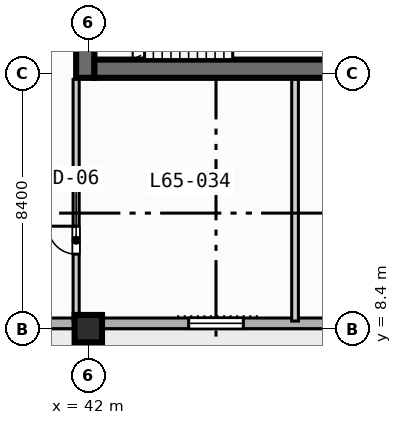
"""IFC4 building model, lengths in metres.
Left out: names, types, materials, properties, quantities, classifications, styles, units other than length and angle.
Written with IfcOpenShell. Run it as: python <this file> out.ifc"""

import sys

from ifc_helpers import new_model, si_unit, direction, frame, frame_2d, origin, origin_2d, place, context, subcontext, project, spatial, rectangle, extrude, element, fill, save


model = new_model("IFC4")
c1 = context("Model", 3, precision=1e-05, world=origin(), true_north=direction((0.0, 1.0)))
c2 = subcontext(c1, "Body", "Model", "MODEL_VIEW")
j1 = project(units=[si_unit("LENGTHUNIT", "METRE"), si_unit("PLANEANGLEUNIT", "RADIAN")], contexts=[c1])
p1 = place(None, origin())
s1 = spatial("IfcSite", under=j1, at=p1, CompositionType="ELEMENT")
p2 = place(p1, origin())
s2 = spatial("IfcBuilding", under=s1, at=p2, CompositionType="ELEMENT")
p3 = place(p2, frame((0.0, 0.0, 263.8)))
s3 = spatial("IfcBuildingStorey", under=s2, at=p3, CompositionType="ELEMENT", Elevation=263.8)
p4 = place(p3, frame((41.9, 16.65, 0.0), z_axis=(0.0, 0.0, 1.0), x_axis=(0.0, 1.0, 0.0)))
e1 = element("IfcWall", 1, at=p4, inside=s3, PredefinedType="SHEAR", context=c2, shape_type="SweptSolid", body=[
    extrude(rectangle(XDim=1.35, YDim=0.6, at=frame_2d((0.675, 0.0))), origin(), (0.0, 0.0, 1.0), 3.47),
])
p5 = place(p3, frame((42.2, 16.95, 0.0), z_axis=(0.0, 0.0, 1.0), x_axis=(1.0, 0.0, 0.0)))
e2 = element("IfcWall", 2, at=p5, inside=s3, PredefinedType="SHEAR", context=c2, shape_type="SweptSolid", body=[
    extrude(rectangle(XDim=16.35, YDim=0.6, at=frame_2d((8.175, 0.0))), origin(), (0.0, 0.0, 1.0), 3.47),
])
p6 = place(p3, frame((42.0, 8.4, 0.0), z_axis=(0.0, 0.0, 1.0), x_axis=(1.0, 0.0, 0.0)))
e3 = element("IfcColumn", 3, at=p6, inside=s3, PredefinedType="COLUMN", context=c2, shape_type="SweptSolid", body=[
    extrude(rectangle(XDim=0.9, YDim=0.9, at=origin_2d()), origin(), (0.0, 0.0, 1.0), 3.7),
])
p7 = place(p3, frame((72.425, 8.575, 0.0), z_axis=(0.0, 0.0, 1.0), x_axis=(-1.0, 0.0, 0.0)))
e4 = element("IfcWall", 4, at=p7, inside=s3, PredefinedType="STANDARD", context=c2, shape_type="SweptSolid", body=[
    extrude(rectangle(XDim=60.85, YDim=0.35, at=frame_2d((30.425, 0.0))), origin(), (0.0, 0.0, 1.0), 3.47),
])
p8 = place(p7, frame((41.325, 0.0, 0.0)))
e5 = element("IfcOpeningElement", 5, at=p8, cuts=e4, PredefinedType="OPENING", context=c2, shape_type="SweptSolid", body=[
    extrude(rectangle(XDim=1.4, YDim=2.2, at=frame_2d((0.7, 1.1))), frame((0.0, 0.185, 0.0), z_axis=(0.0, -1.0, 0.0), x_axis=(1.0, 0.0, 0.0)), (0.0, 0.0, 1.0), 0.37),
])
p9 = place(p7, frame((50.225, 0.0, 0.85)))
e6 = element("IfcOpeningElement", 6, at=p9, cuts=e4, PredefinedType="OPENING", context=c2, shape_type="SweptSolid", body=[
    extrude(rectangle(XDim=2.4, YDim=1.95, at=frame_2d((1.2, 0.975))), frame((0.0, 0.185, 0.0), z_axis=(0.0, -1.0, 0.0), x_axis=(1.0, 0.0, 0.0)), (0.0, 0.0, 1.0), 0.37),
])
p10 = place(p7, frame((33.425, 0.0, 0.85)))
e7 = element("IfcOpeningElement", 7, at=p10, cuts=e4, PredefinedType="OPENING", context=c2, shape_type="SweptSolid", body=[
    extrude(rectangle(XDim=2.4, YDim=1.95, at=frame_2d((1.2, 0.975))), frame((0.0, 0.185, 0.0), z_axis=(0.0, -1.0, 0.0), x_axis=(1.0, 0.0, 0.0)), (0.0, 0.0, 1.0), 0.37),
])
p11 = place(p7, frame((25.325, 0.0, 0.85)))
e8 = element("IfcOpeningElement", 8, at=p11, cuts=e4, PredefinedType="OPENING", context=c2, shape_type="SweptSolid", body=[
    extrude(rectangle(XDim=1.8, YDim=1.8, at=frame_2d((0.9, 0.9))), frame((0.0, 0.185, 0.0), z_axis=(0.0, -1.0, 0.0), x_axis=(1.0, 0.0, 0.0)), (0.0, 0.0, 1.0), 0.37),
])
p12 = place(p7, frame((58.15, 0.0, 0.85)))
e9 = element("IfcOpeningElement", 9, at=p12, cuts=e4, PredefinedType="OPENING", context=c2, shape_type="SweptSolid", body=[
    extrude(rectangle(XDim=1.8, YDim=1.8, at=frame_2d((0.9, 0.9))), frame((0.0, 0.185, 0.0), z_axis=(0.0, -1.0, 0.0), x_axis=(1.0, 0.0, 0.0)), (0.0, 0.0, 1.0), 0.37),
])
p13 = place(p7, frame((56.29, 0.0, 0.85)))
e10 = element("IfcOpeningElement", 10, at=p13, cuts=e4, PredefinedType="OPENING", context=c2, shape_type="SweptSolid", body=[
    extrude(rectangle(XDim=0.72, YDim=1.8, at=frame_2d((0.36, 0.9))), frame((0.0, 0.185, 0.0), z_axis=(0.0, -1.0, 0.0), x_axis=(1.0, 0.0, 0.0)), (0.0, 0.0, 1.0), 0.37),
])
p14 = place(p7, frame((44.15, 0.0, 0.85)))
e11 = element("IfcOpeningElement", 11, at=p14, cuts=e4, PredefinedType="OPENING", context=c2, shape_type="SweptSolid", body=[
    extrude(rectangle(XDim=1.8, YDim=1.8, at=frame_2d((0.9, 0.9))), frame((0.0, 0.185, 0.0), z_axis=(0.0, -1.0, 0.0), x_axis=(1.0, 0.0, 0.0)), (0.0, 0.0, 1.0), 0.37),
])
p15 = place(p3, frame((41.6, 8.65, 0.0), z_axis=(0.0, 0.0, 1.0), x_axis=(0.0, 1.0, 0.0)))
e12 = element("IfcWall", 12, at=p15, inside=s3, PredefinedType="PARTITIONING", context=c2, shape_type="SweptSolid", body=[
    extrude(rectangle(XDim=7.95, YDim=0.2, at=frame_2d((3.975, 0.0))), origin(), (0.0, 0.0, 1.0), 3.47),
])
p16 = place(p15, frame((2.2, 0.0, 0.0)))
e13 = element("IfcOpeningElement", 13, at=p16, cuts=e12, PredefinedType="OPENING", context=c2, shape_type="SweptSolid", body=[
    extrude(rectangle(XDim=0.92, YDim=2.1, at=frame_2d((0.46, 1.05))), frame((0.0, 0.11, 0.0), z_axis=(0.0, -1.0, 0.0), x_axis=(1.0, 0.0, 0.0)), (0.0, 0.0, 1.0), 0.22),
])
p17 = place(p3, frame((48.8, 8.65, 0.0), z_axis=(0.0, 0.0, 1.0), x_axis=(0.0, 1.0, 0.0)))
e14 = element("IfcWall", 14, at=p17, inside=s3, PredefinedType="PARTITIONING", context=c2, shape_type="SweptSolid", body=[
    extrude(rectangle(XDim=7.95, YDim=0.22, at=frame_2d((3.975, 0.0))), origin(), (0.0, 0.0, 1.0), 3.47),
])
p18 = place(p11, origin())
e15 = element("IfcWindow", 15, at=p18, inside=s3, PartitioningType="SINGLE_PANEL", PredefinedType="WINDOW", context=c2, shape_type="SweptSolid", body=[
    extrude(rectangle(XDim=1.8, YDim=1.8, at=frame_2d((0.9, 0.9))), frame((0.0, 0.03, 0.0), z_axis=(0.0, -1.0, 0.0), x_axis=(1.0, 0.0, 0.0)), (0.0, 0.0, 1.0), 0.06),
])
fill(e8, e15)
p19 = place(p16, origin())
e16 = element("IfcDoor", 16, at=p19, inside=s3, OperationType="SINGLE_SWING_RIGHT", PredefinedType="DOOR", context=c2, shape_type="SweptSolid", body=[
    extrude(rectangle(XDim=0.92, YDim=2.1, at=frame_2d((0.46, 1.05))), frame((0.0, 0.025, 0.0), z_axis=(0.0, -1.0, 0.0), x_axis=(1.0, 0.0, 0.0)), (0.0, 0.0, 1.0), 0.05),
])
fill(e13, e16)
save(model, sys.argv[1])
